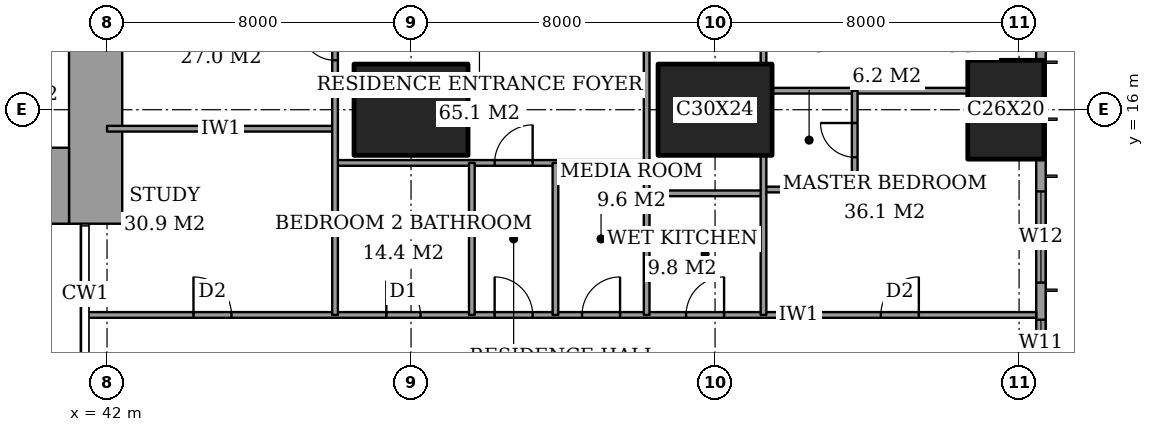
"""IFC4 building model, lengths in metres.
Left out: names, types, materials, properties, quantities, classifications, styles, units other than length and angle.
Written with IfcOpenShell. Run it as: python <this file> out.ifc"""

import sys

from ifc_helpers import new_model, si_unit, direction, frame, frame_2d, origin, origin_2d, place, context, subcontext, project, spatial, rectangle, extrude, element, fill, save


model = new_model("IFC4")
c1 = context("Model", 3, precision=1e-05, world=origin(), true_north=direction((0.0, 1.0)))
c2 = subcontext(c1, "Body", "Model", "MODEL_VIEW")
j1 = project(units=[si_unit("LENGTHUNIT", "METRE"), si_unit("PLANEANGLEUNIT", "RADIAN")], contexts=[c1])
p1 = place(None, origin())
s1 = spatial("IfcSite", under=j1, at=p1, CompositionType="ELEMENT")
p2 = place(p1, origin())
s2 = spatial("IfcBuilding", under=s1, at=p2, CompositionType="ELEMENT")
p3 = place(p2, frame((0.0, 0.0, 96.2)))
s3 = spatial("IfcBuildingStorey", under=s2, at=p3, CompositionType="ELEMENT", Elevation=96.2)
for number, where, z_axis, x_axis in (
    (1, (50.0, 16.0, 0.0), (0.0, 0.0, 1.0), (1.0, 0.0, 0.0)),
    (2, (58.0, 16.0, 0.0), (0.0, 0.0, 1.0), (1.0, 0.0, 0.0)),
):
    element("IfcColumn", number, at=place(p3, frame(where, z_axis=z_axis, x_axis=x_axis)), inside=s3, PredefinedType="COLUMN", context=c2, shape_type="SweptSolid", body=[
        extrude(rectangle(XDim=3.0, YDim=2.4, at=origin_2d()), origin(), (0.0, 0.0, 1.0), 3.6),
    ])
p4 = place(p3, frame((65.65, 16.0, 0.0), z_axis=(0.0, 0.0, 1.0), x_axis=(0.0, 1.0, 0.0)))
e3 = element("IfcColumn", 3, at=p4, inside=s3, PredefinedType="COLUMN", context=c2, shape_type="SweptSolid", body=[
    extrude(rectangle(XDim=2.6, YDim=2.0, at=origin_2d()), origin(), (0.0, 0.0, 1.0), 3.6),
])
p5 = place(p3, frame((37.85, 14.0, 0.0), z_axis=(0.0, 0.0, 1.0), x_axis=(1.0, 0.0, 0.0)))
e4 = element("IfcWall", 4, at=p5, inside=s3, PredefinedType="SHEAR", context=c2, shape_type="SweptSolid", body=[
    extrude(rectangle(XDim=3.15, YDim=2.0, at=frame_2d((1.575, 0.0))), origin(), (0.0, 0.0, 1.0), 3.6),
])
p6 = place(p3, frame((41.7, 13.0, 0.0), z_axis=(0.0, 0.0, 1.0), x_axis=(0.0, 1.0, 0.0)))
e5 = element("IfcWall", 5, at=p6, inside=s3, PredefinedType="SHEAR", context=c2, shape_type="SweptSolid", body=[
    extrude(rectangle(XDim=11.85, YDim=1.4, at=frame_2d((5.925, 0.0))), origin(), (0.0, 0.0, 1.0), 3.6),
])
p7 = place(p6, frame((7.5, 0.0, 0.0)))
e6 = element("IfcOpeningElement", 6, at=p7, cuts=e5, PredefinedType="OPENING", context=c2, shape_type="SweptSolid", body=[
    extrude(rectangle(XDim=1.8, YDim=2.4, at=frame_2d((0.9, 1.2))), frame((0.0, 0.71, 0.0), z_axis=(0.0, -1.0, 0.0), x_axis=(1.0, 0.0, 0.0)), (0.0, 0.0, 1.0), 1.42),
])
p8 = place(p3, frame((66.575, 3.175, 0.0), z_axis=(0.0, 0.0, 1.0), x_axis=(0.0, 1.0, 0.0)))
e7 = element("IfcWall", 7, at=p8, inside=s3, PredefinedType="SOLIDWALL", context=c2, shape_type="SweptSolid", body=[
    extrude(rectangle(XDim=41.65, YDim=0.25, at=frame_2d((20.825, 0.0))), origin(), (0.0, 0.0, 1.0), 3.6),
])
p9 = place(p8, frame((0.775, 0.0, 0.4)))
e8 = element("IfcOpeningElement", 8, at=p9, cuts=e7, PredefinedType="OPENING", context=c2, shape_type="SweptSolid", body=[
    extrude(rectangle(XDim=2.4, YDim=2.2, at=frame_2d((1.2, 1.1))), frame((0.0, 0.135, 0.0), z_axis=(0.0, -1.0, 0.0), x_axis=(1.0, 0.0, 0.0)), (0.0, 0.0, 1.0), 0.27),
])
p10 = place(p8, frame((6.1, 0.0, 0.4)))
e9 = element("IfcOpeningElement", 9, at=p10, cuts=e7, PredefinedType="OPENING", context=c2, shape_type="SweptSolid", body=[
    extrude(rectangle(XDim=1.2, YDim=2.2, at=frame_2d((0.6, 1.1))), frame((0.0, 0.135, 0.0), z_axis=(0.0, -1.0, 0.0), x_axis=(1.0, 0.0, 0.0)), (0.0, 0.0, 1.0), 0.27),
])
p11 = place(p8, frame((8.275, 0.0, 0.4)))
e10 = element("IfcOpeningElement", 10, at=p11, cuts=e7, PredefinedType="OPENING", context=c2, shape_type="SweptSolid", body=[
    extrude(rectangle(XDim=2.4, YDim=2.2, at=frame_2d((1.2, 1.1))), frame((0.0, 0.135, 0.0), z_axis=(0.0, -1.0, 0.0), x_axis=(1.0, 0.0, 0.0)), (0.0, 0.0, 1.0), 0.27),
])
p12 = place(p8, frame((15.775, 0.0, 0.4)))
e11 = element("IfcOpeningElement", 11, at=p12, cuts=e7, PredefinedType="OPENING", context=c2, shape_type="SweptSolid", body=[
    extrude(rectangle(XDim=2.4, YDim=2.2, at=frame_2d((1.2, 1.1))), frame((0.0, 0.135, 0.0), z_axis=(0.0, -1.0, 0.0), x_axis=(1.0, 0.0, 0.0)), (0.0, 0.0, 1.0), 0.27),
])
p13 = place(p8, frame((23.475, 0.0, 0.4)))
e12 = element("IfcOpeningElement", 12, at=p13, cuts=e7, PredefinedType="OPENING", context=c2, shape_type="SweptSolid", body=[
    extrude(rectangle(XDim=2.4, YDim=2.2, at=frame_2d((1.2, 1.1))), frame((0.0, 0.135, 0.0), z_axis=(0.0, -1.0, 0.0), x_axis=(1.0, 0.0, 0.0)), (0.0, 0.0, 1.0), 0.27),
])
p14 = place(p8, frame((30.975, 0.0, 0.4)))
e13 = element("IfcOpeningElement", 13, at=p14, cuts=e7, PredefinedType="OPENING", context=c2, shape_type="SweptSolid", body=[
    extrude(rectangle(XDim=2.4, YDim=2.2, at=frame_2d((1.2, 1.1))), frame((0.0, 0.135, 0.0), z_axis=(0.0, -1.0, 0.0), x_axis=(1.0, 0.0, 0.0)), (0.0, 0.0, 1.0), 0.27),
])
p15 = place(p8, frame((34.5, 0.0, 0.4)))
e14 = element("IfcOpeningElement", 14, at=p15, cuts=e7, PredefinedType="OPENING", context=c2, shape_type="SweptSolid", body=[
    extrude(rectangle(XDim=1.2, YDim=2.2, at=frame_2d((0.6, 1.1))), frame((0.0, 0.135, 0.0), z_axis=(0.0, -1.0, 0.0), x_axis=(1.0, 0.0, 0.0)), (0.0, 0.0, 1.0), 0.27),
])
p16 = place(p8, frame((38.475, 0.0, 0.4)))
e15 = element("IfcOpeningElement", 15, at=p16, cuts=e7, PredefinedType="OPENING", context=c2, shape_type="SweptSolid", body=[
    extrude(rectangle(XDim=2.4, YDim=2.2, at=frame_2d((1.2, 1.1))), frame((0.0, 0.135, 0.0), z_axis=(0.0, -1.0, 0.0), x_axis=(1.0, 0.0, 0.0)), (0.0, 0.0, 1.0), 0.27),
])
p17 = place(p3, frame((41.439, 10.6, 0.0), z_axis=(0.0, 0.0, 1.0), x_axis=(1.0, 0.0, 0.0)))
e16 = element("IfcWall", 16, at=p17, inside=s3, PredefinedType="PARTITIONING", context=c2, shape_type="SweptSolid", body=[
    extrude(rectangle(XDim=25.011, YDim=0.15, at=frame_2d((12.505, 0.0))), origin(), (0.0, 0.0, 1.0), 3.35),
])
p18 = place(p17, frame((10.761, 0.0, 0.0)))
e17 = element("IfcOpeningElement", 17, at=p18, cuts=e16, PredefinedType="OPENING", context=c2, shape_type="SweptSolid", body=[
    extrude(rectangle(XDim=1.0, YDim=2.1, at=frame_2d((0.5, 1.05))), frame((0.0, 0.085, 0.0), z_axis=(0.0, -1.0, 0.0), x_axis=(1.0, 0.0, 0.0)), (0.0, 0.0, 1.0), 0.17),
])
p19 = place(p17, frame((20.924, 0.0, 0.0)))
e18 = element("IfcOpeningElement", 18, at=p19, cuts=e16, PredefinedType="OPENING", context=c2, shape_type="SweptSolid", body=[
    extrude(rectangle(XDim=1.0, YDim=2.1, at=frame_2d((0.5, 1.05))), frame((0.0, 0.085, 0.0), z_axis=(0.0, -1.0, 0.0), x_axis=(1.0, 0.0, 0.0)), (0.0, 0.0, 1.0), 0.17),
])
p20 = place(p17, frame((15.799, 0.0, 0.0)))
e19 = element("IfcOpeningElement", 19, at=p20, cuts=e16, PredefinedType="OPENING", context=c2, shape_type="SweptSolid", body=[
    extrude(rectangle(XDim=1.0, YDim=2.1, at=frame_2d((0.5, 1.05))), frame((0.0, 0.085, 0.0), z_axis=(0.0, -1.0, 0.0), x_axis=(1.0, 0.0, 0.0)), (0.0, 0.0, 1.0), 0.17),
])
p21 = place(p17, frame((13.061, 0.0, 0.0)))
e20 = element("IfcOpeningElement", 20, at=p21, cuts=e16, PredefinedType="OPENING", context=c2, shape_type="SweptSolid", body=[
    extrude(rectangle(XDim=1.0, YDim=2.1, at=frame_2d((0.5, 1.05))), frame((0.0, 0.085, 0.0), z_axis=(0.0, -1.0, 0.0), x_axis=(1.0, 0.0, 0.0)), (0.0, 0.0, 1.0), 0.17),
])
p22 = place(p17, frame((7.911, 0.0, 0.0)))
e21 = element("IfcOpeningElement", 21, at=p22, cuts=e16, PredefinedType="OPENING", context=c2, shape_type="SweptSolid", body=[
    extrude(rectangle(XDim=0.9, YDim=2.1, at=frame_2d((0.45, 1.05))), frame((0.0, 0.085, 0.0), z_axis=(0.0, -1.0, 0.0), x_axis=(1.0, 0.0, 0.0)), (0.0, 0.0, 1.0), 0.17),
])
p23 = place(p17, frame((2.836, 0.0, 0.0)))
e22 = element("IfcOpeningElement", 22, at=p23, cuts=e16, PredefinedType="OPENING", context=c2, shape_type="SweptSolid", body=[
    extrude(rectangle(XDim=1.0, YDim=2.1, at=frame_2d((0.5, 1.05))), frame((0.0, 0.085, 0.0), z_axis=(0.0, -1.0, 0.0), x_axis=(1.0, 0.0, 0.0)), (0.0, 0.0, 1.0), 0.17),
])
p24 = place(p3, frame((56.2, 13.8, 0.0), z_axis=(0.0, 0.0, 1.0), x_axis=(1.0, 0.0, 0.0)))
e23 = element("IfcWall", 23, at=p24, inside=s3, PredefinedType="PARTITIONING", context=c2, shape_type="SweptSolid", body=[
    extrude(rectangle(XDim=3.075, YDim=0.15, at=frame_2d((1.538, 0.0))), origin(), (0.0, 0.0, 1.0), 3.35),
])
p25 = place(p3, frame((59.275, 13.9, 0.0), z_axis=(0.0, 0.0, 1.0), x_axis=(1.0, 0.0, 0.0)))
e24 = element("IfcWall", 24, at=p25, inside=s3, PredefinedType="PARTITIONING", context=c2, shape_type="SweptSolid", body=[
    extrude(rectangle(XDim=2.4, YDim=0.15, at=frame_2d((1.2, 0.0))), origin(), (0.0, 0.0, 1.0), 3.35),
])
p26 = place(p3, frame((48.0, 14.6, 0.0), z_axis=(0.0, 0.0, 1.0), x_axis=(1.0, 0.0, 0.0)))
e25 = element("IfcWall", 25, at=p26, inside=s3, PredefinedType="PARTITIONING", context=c2, shape_type="SweptSolid", body=[
    extrude(rectangle(XDim=8.2, YDim=0.15, at=frame_2d((4.1, 0.0))), origin(), (0.0, 0.0, 1.0), 3.35),
])
p27 = place(p26, frame((4.2, 0.0, 0.0)))
e26 = element("IfcOpeningElement", 26, at=p27, cuts=e25, PredefinedType="OPENING", context=c2, shape_type="SweptSolid", body=[
    extrude(rectangle(XDim=1.0, YDim=2.1, at=frame_2d((0.5, 1.05))), frame((0.0, 0.085, 0.0), z_axis=(0.0, -1.0, 0.0), x_axis=(1.0, 0.0, 0.0)), (0.0, 0.0, 1.0), 0.17),
])
p28 = place(p3, frame((42.0, 15.5, 0.0), z_axis=(0.0, 0.0, 1.0), x_axis=(1.0, 0.0, 0.0)))
e27 = element("IfcWall", 27, at=p28, inside=s3, PredefinedType="PARTITIONING", context=c2, shape_type="SweptSolid", body=[
    extrude(rectangle(XDim=6.0, YDim=0.15, at=frame_2d((3.0, 0.0))), origin(), (0.0, 0.0, 1.0), 3.35),
])
p29 = place(p3, frame((59.5, 16.5, 0.0), z_axis=(0.0, 0.0, 1.0), x_axis=(1.0, 0.0, 0.0)))
e28 = element("IfcWall", 28, at=p29, inside=s3, PredefinedType="PARTITIONING", context=c2, shape_type="SweptSolid", body=[
    extrude(rectangle(XDim=5.15, YDim=0.15, at=frame_2d((2.575, 0.0))), origin(), (0.0, 0.0, 1.0), 3.35),
])
p30 = place(p3, frame((48.0, 10.6, 0.0), z_axis=(0.0, 0.0, 1.0), x_axis=(0.0, 1.0, 0.0)))
e29 = element("IfcWall", 29, at=p30, inside=s3, PredefinedType="PARTITIONING", context=c2, shape_type="SweptSolid", body=[
    extrude(rectangle(XDim=13.4, YDim=0.15, at=frame_2d((6.7, 0.0))), origin(), (0.0, 0.0, 1.0), 3.35),
])
p31 = place(p30, frame((10.8, 0.0, 0.0)))
e30 = element("IfcOpeningElement", 30, at=p31, cuts=e29, PredefinedType="OPENING", context=c2, shape_type="SweptSolid", body=[
    extrude(rectangle(XDim=1.2, YDim=2.4, at=frame_2d((0.6, 1.2))), frame((0.0, 0.085, 0.0), z_axis=(0.0, -1.0, 0.0), x_axis=(1.0, 0.0, 0.0)), (0.0, 0.0, 1.0), 0.17),
])
p32 = place(p30, frame((6.7, 0.0, 0.0)))
e31 = element("IfcOpeningElement", 31, at=p32, cuts=e29, PredefinedType="OPENING", context=c2, shape_type="SweptSolid", body=[
    extrude(rectangle(XDim=0.9, YDim=2.1, at=frame_2d((0.45, 1.05))), frame((0.0, 0.085, 0.0), z_axis=(0.0, -1.0, 0.0), x_axis=(1.0, 0.0, 0.0)), (0.0, 0.0, 1.0), 0.17),
])
for number, where, z_axis, x_axis in (
    (32, (51.6, 10.6, 0.0), (0.0, 0.0, 1.0), (0.0, 1.0, 0.0)),
    (33, (53.8, 10.6, 0.0), (0.0, 0.0, 1.0), (0.0, 1.0, 0.0)),
):
    element("IfcWall", number, at=place(p3, frame(where, z_axis=z_axis, x_axis=x_axis)), inside=s3, PredefinedType="PARTITIONING", context=c2, shape_type="SweptSolid", body=[
        extrude(rectangle(XDim=4.0, YDim=0.15, at=frame_2d((2.0, 0.0))), origin(), (0.0, 0.0, 1.0), 3.35),
    ])
p33 = place(p3, frame((56.2, 10.6, 0.0), z_axis=(0.0, 0.0, 1.0), x_axis=(0.0, 1.0, 0.0)))
e34 = element("IfcWall", 34, at=p33, inside=s3, PredefinedType="PARTITIONING", context=c2, shape_type="SweptSolid", body=[
    extrude(rectangle(XDim=11.0, YDim=0.15, at=frame_2d((5.5, 0.0))), origin(), (0.0, 0.0, 1.0), 3.35),
])
p34 = place(p33, frame((7.0, 0.0, 0.0)))
e35 = element("IfcOpeningElement", 35, at=p34, cuts=e34, PredefinedType="OPENING", context=c2, shape_type="SweptSolid", body=[
    extrude(rectangle(XDim=1.0, YDim=2.1, at=frame_2d((0.5, 1.05))), frame((0.0, 0.085, 0.0), z_axis=(0.0, -1.0, 0.0), x_axis=(1.0, 0.0, 0.0)), (0.0, 0.0, 1.0), 0.17),
])
p35 = place(p3, frame((59.275, 10.6, 0.0), z_axis=(0.0, 0.0, 1.0), x_axis=(0.0, 1.0, 0.0)))
e36 = element("IfcWall", 36, at=p35, inside=s3, PredefinedType="PARTITIONING", context=c2, shape_type="SweptSolid", body=[
    extrude(rectangle(XDim=4.2, YDim=0.15, at=frame_2d((2.1, 0.0))), origin(), (0.0, 0.0, 1.0), 3.35),
])
p36 = place(p3, frame((59.275, 17.2, 0.0), z_axis=(0.0, 0.0, 1.0), x_axis=(0.0, 1.0, 0.0)))
e37 = element("IfcWall", 37, at=p36, inside=s3, PredefinedType="PARTITIONING", context=c2, shape_type="SweptSolid", body=[
    extrude(rectangle(XDim=2.45, YDim=0.15, at=frame_2d((1.225, 0.0))), origin(), (0.0, 0.0, 1.0), 3.35),
])
p37 = place(p36, frame((0.538, 0.0, 0.0)))
e38 = element("IfcOpeningElement", 38, at=p37, cuts=e37, PredefinedType="OPENING", context=c2, shape_type="SweptSolid", body=[
    extrude(rectangle(XDim=1.0, YDim=2.1, at=frame_2d((0.5, 1.05))), frame((0.0, 0.085, 0.0), z_axis=(0.0, -1.0, 0.0), x_axis=(1.0, 0.0, 0.0)), (0.0, 0.0, 1.0), 0.17),
])
p38 = place(p3, frame((61.675, 13.9, 0.0), z_axis=(0.0, 0.0, 1.0), x_axis=(0.0, 1.0, 0.0)))
e39 = element("IfcWall", 39, at=p38, inside=s3, PredefinedType="PARTITIONING", context=c2, shape_type="SweptSolid", body=[
    extrude(rectangle(XDim=2.6, YDim=0.15, at=frame_2d((1.3, 0.0))), origin(), (0.0, 0.0, 1.0), 3.35),
])
p39 = place(p38, frame((0.85, 0.0, 0.0)))
e40 = element("IfcOpeningElement", 40, at=p39, cuts=e39, PredefinedType="OPENING", context=c2, shape_type="SweptSolid", body=[
    extrude(rectangle(XDim=0.9, YDim=2.1, at=frame_2d((0.45, 1.05))), frame((0.0, 0.085, 0.0), z_axis=(0.0, -1.0, 0.0), x_axis=(1.0, 0.0, 0.0)), (0.0, 0.0, 1.0), 0.17),
])
p40 = place(p10, origin())
e41 = element("IfcWindow", 41, at=p40, inside=s3, PartitioningType="SINGLE_PANEL", PredefinedType="WINDOW", context=c2, shape_type="SweptSolid", body=[
    extrude(rectangle(XDim=1.2, YDim=2.2, at=frame_2d((0.6, 1.1))), frame((0.0, 0.03, 0.0), z_axis=(0.0, -1.0, 0.0), x_axis=(1.0, 0.0, 0.0)), (0.0, 0.0, 1.0), 0.06),
])
fill(e9, e41)
p41 = place(p11, origin())
e42 = element("IfcWindow", 42, at=p41, inside=s3, PartitioningType="SINGLE_PANEL", PredefinedType="WINDOW", context=c2, shape_type="SweptSolid", body=[
    extrude(rectangle(XDim=2.4, YDim=2.2, at=frame_2d((1.2, 1.1))), frame((0.0, 0.03, 0.0), z_axis=(0.0, -1.0, 0.0), x_axis=(1.0, 0.0, 0.0)), (0.0, 0.0, 1.0), 0.06),
])
fill(e10, e42)
p42 = place(p18, origin())
e43 = element("IfcDoor", 43, at=p42, inside=s3, OperationType="SINGLE_SWING_RIGHT", PredefinedType="DOOR", context=c2, shape_type="SweptSolid", body=[
    extrude(rectangle(XDim=1.0, YDim=2.1, at=frame_2d((0.5, 1.05))), frame((0.0, 0.025, 0.0), z_axis=(0.0, -1.0, 0.0), x_axis=(1.0, 0.0, 0.0)), (0.0, 0.0, 1.0), 0.05),
])
fill(e17, e43)
p43 = place(p39, origin())
e44 = element("IfcDoor", 44, at=p43, inside=s3, OperationType="SINGLE_SWING_LEFT", PredefinedType="DOOR", context=c2, shape_type="SweptSolid", body=[
    extrude(rectangle(XDim=0.9, YDim=2.1, at=frame_2d((0.45, 1.05))), frame((0.0, 0.025, 0.0), z_axis=(0.0, -1.0, 0.0), x_axis=(1.0, 0.0, 0.0)), (0.0, 0.0, 1.0), 0.05),
])
fill(e40, e44)
p44 = place(p19, origin())
e45 = element("IfcDoor", 45, at=p44, inside=s3, OperationType="SINGLE_SWING_LEFT", PredefinedType="DOOR", context=c2, shape_type="SweptSolid", body=[
    extrude(rectangle(XDim=1.0, YDim=2.1, at=frame_2d((0.5, 1.05))), frame((0.0, 0.025, 0.0), z_axis=(0.0, -1.0, 0.0), x_axis=(1.0, 0.0, 0.0)), (0.0, 0.0, 1.0), 0.05),
])
fill(e18, e45)
p45 = place(p20, origin())
e46 = element("IfcDoor", 46, at=p45, inside=s3, OperationType="SINGLE_SWING_LEFT", PredefinedType="DOOR", context=c2, shape_type="SweptSolid", body=[
    extrude(rectangle(XDim=1.0, YDim=2.1, at=frame_2d((0.5, 1.05))), frame((0.0, 0.025, 0.0), z_axis=(0.0, -1.0, 0.0), x_axis=(1.0, 0.0, 0.0)), (0.0, 0.0, 1.0), 0.05),
])
fill(e19, e46)
p46 = place(p21, origin())
e47 = element("IfcDoor", 47, at=p46, inside=s3, OperationType="SINGLE_SWING_LEFT", PredefinedType="DOOR", context=c2, shape_type="SweptSolid", body=[
    extrude(rectangle(XDim=1.0, YDim=2.1, at=frame_2d((0.5, 1.05))), frame((0.0, 0.025, 0.0), z_axis=(0.0, -1.0, 0.0), x_axis=(1.0, 0.0, 0.0)), (0.0, 0.0, 1.0), 0.05),
])
fill(e20, e47)
p47 = place(p27, origin())
e48 = element("IfcDoor", 48, at=p47, inside=s3, OperationType="SINGLE_SWING_LEFT", PredefinedType="DOOR", context=c2, shape_type="SweptSolid", body=[
    extrude(rectangle(XDim=1.0, YDim=2.1, at=frame_2d((0.5, 1.05))), frame((0.0, 0.025, 0.0), z_axis=(0.0, -1.0, 0.0), x_axis=(1.0, 0.0, 0.0)), (0.0, 0.0, 1.0), 0.05),
])
fill(e26, e48)
p48 = place(p22, origin())
e49 = element("IfcDoor", 49, at=p48, inside=s3, OperationType="SINGLE_SWING_RIGHT", PredefinedType="DOOR", context=c2, shape_type="SweptSolid", body=[
    extrude(rectangle(XDim=0.9, YDim=2.1, at=frame_2d((0.45, 1.05))), frame((0.0, 0.025, 0.0), z_axis=(0.0, -1.0, 0.0), x_axis=(1.0, 0.0, 0.0)), (0.0, 0.0, 1.0), 0.05),
])
fill(e21, e49)
p49 = place(p23, origin())
e50 = element("IfcDoor", 50, at=p49, inside=s3, OperationType="SINGLE_SWING_RIGHT", PredefinedType="DOOR", context=c2, shape_type="SweptSolid", body=[
    extrude(rectangle(XDim=1.0, YDim=2.1, at=frame_2d((0.5, 1.05))), frame((0.0, 0.025, 0.0), z_axis=(0.0, -1.0, 0.0), x_axis=(1.0, 0.0, 0.0)), (0.0, 0.0, 1.0), 0.05),
])
fill(e22, e50)
p50 = place(p32, origin())
e51 = element("IfcDoor", 51, at=p50, inside=s3, OperationType="SINGLE_SWING_LEFT", PredefinedType="DOOR", context=c2, shape_type="SweptSolid", body=[
    extrude(rectangle(XDim=0.9, YDim=2.1, at=frame_2d((0.45, 1.05))), frame((0.0, 0.025, 0.0), z_axis=(0.0, -1.0, 0.0), x_axis=(1.0, 0.0, 0.0)), (0.0, 0.0, 1.0), 0.05),
])
fill(e31, e51)
save(model, sys.argv[1])
